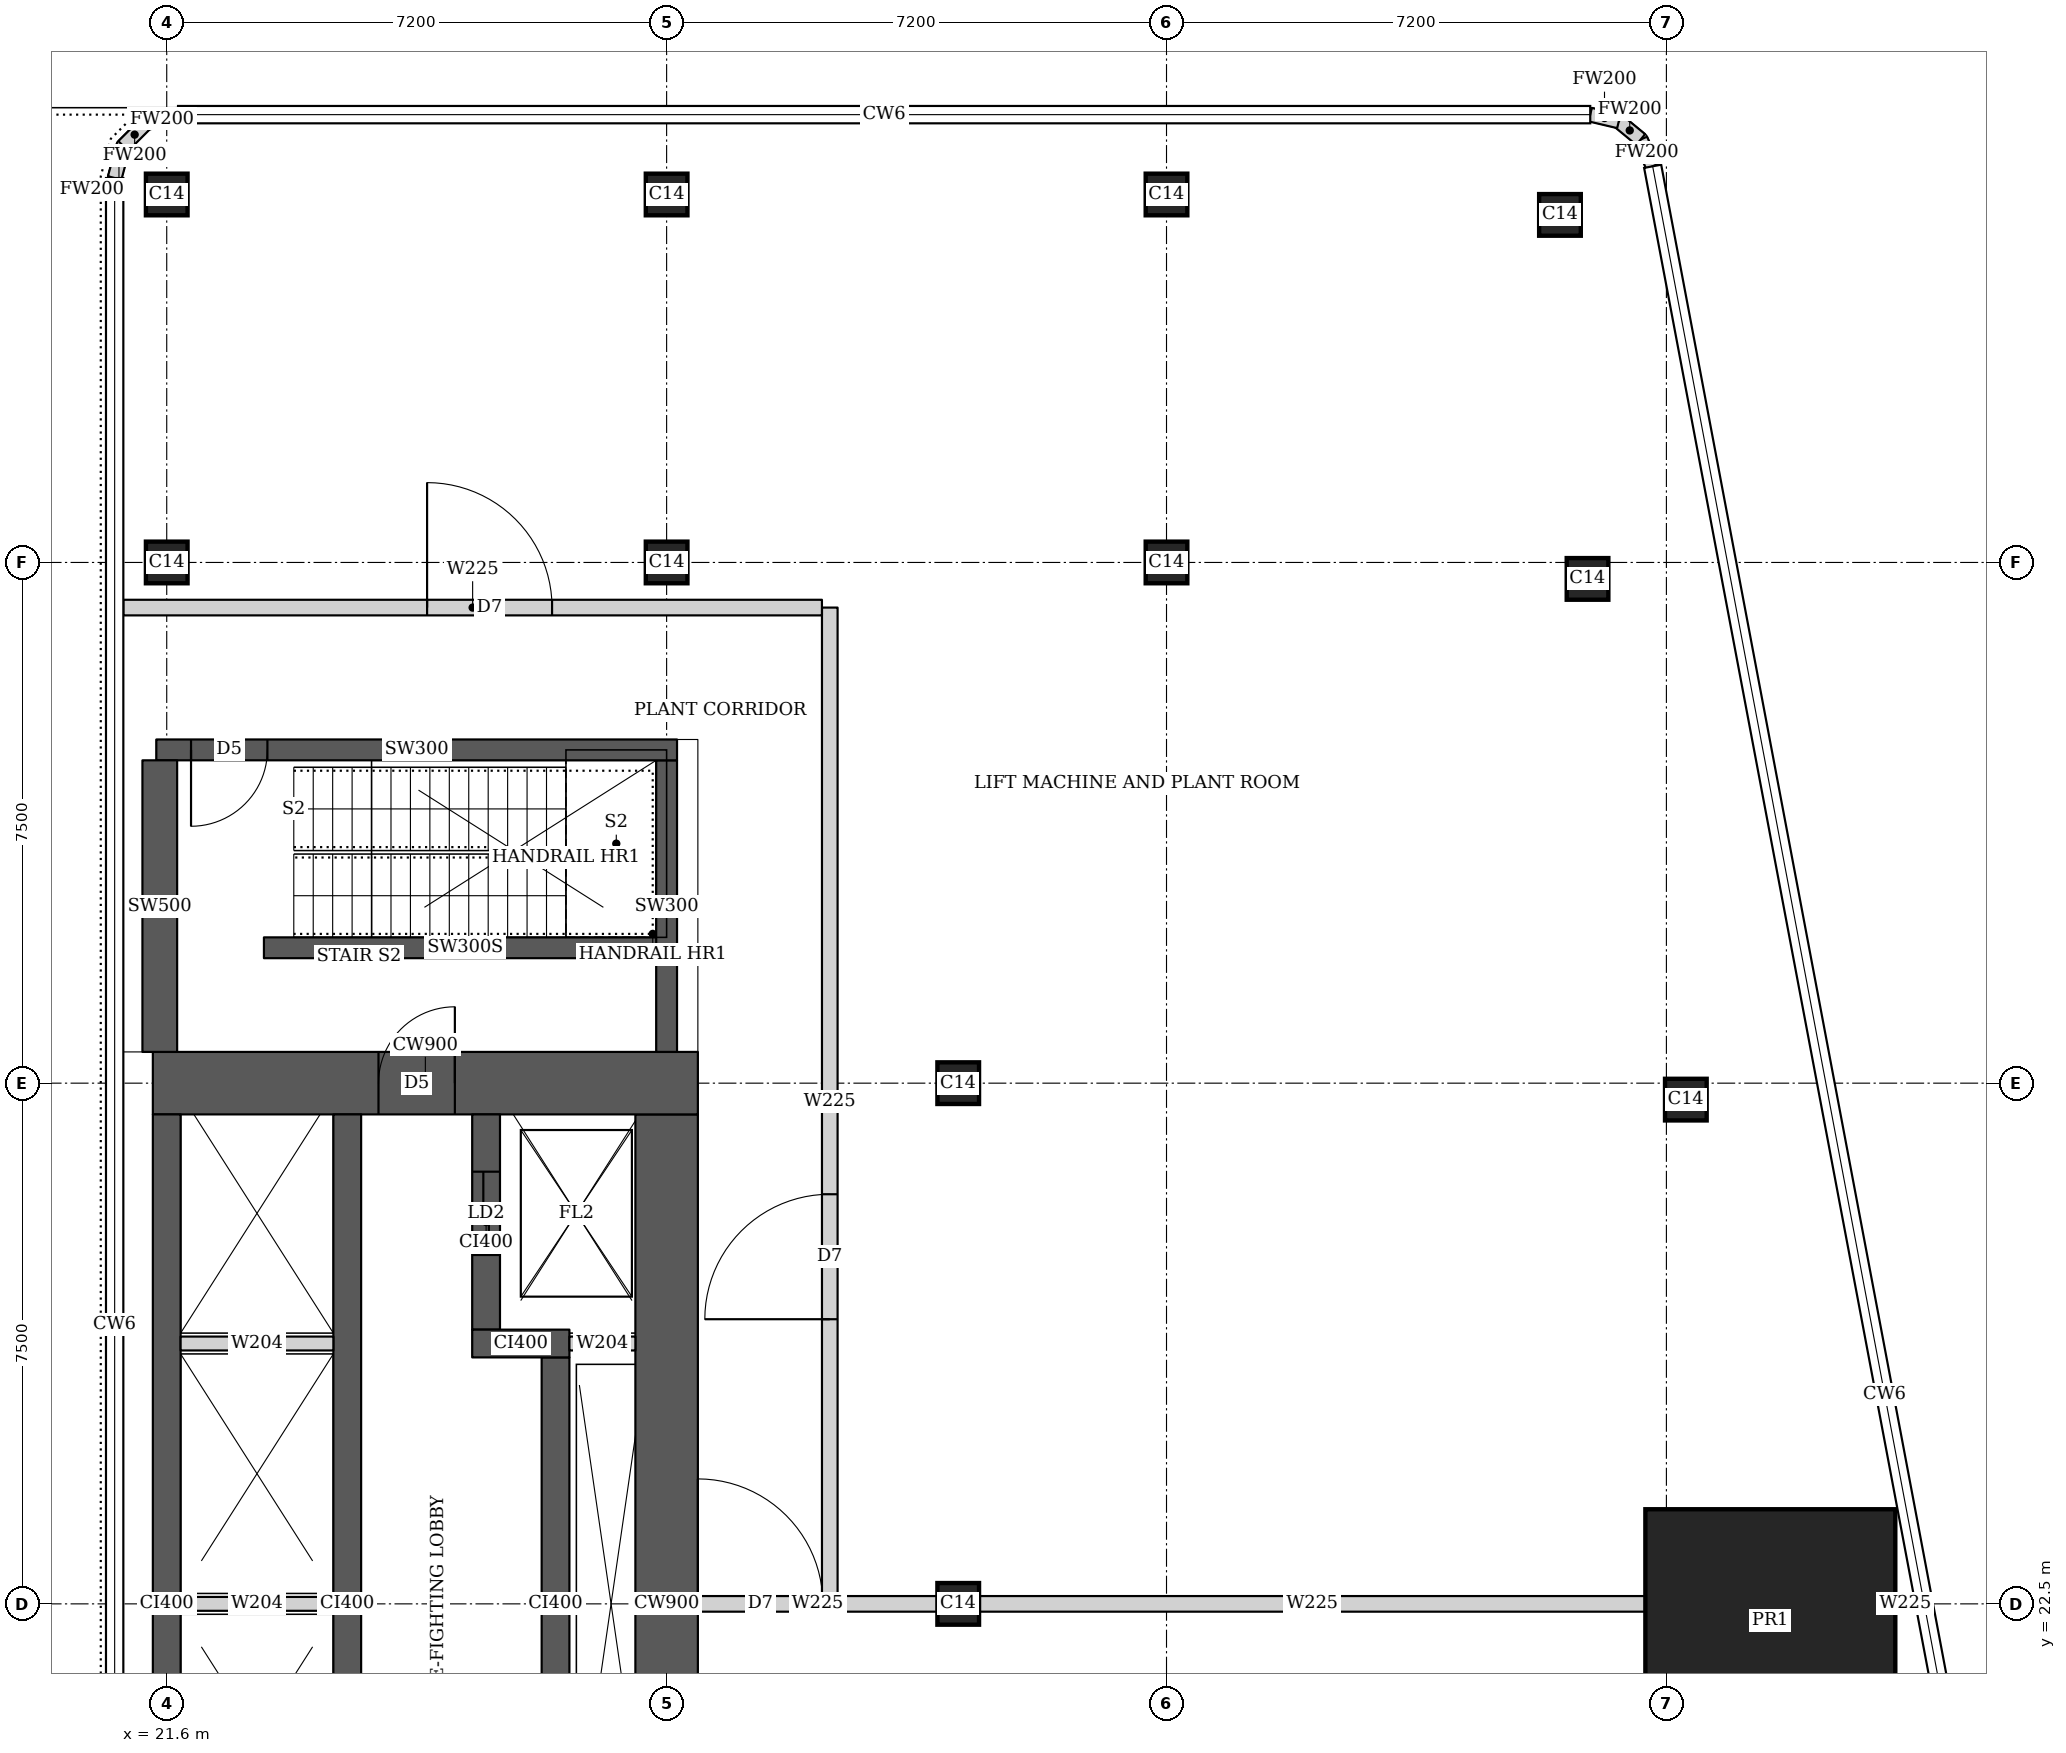
"""IFC4 building model, lengths in metres.
Left out: names, types, materials, properties, quantities, classifications, styles, units other than length and angle.
Written with IfcOpenShell. Run it as: python <this file> out.ifc"""

import sys

from ifc_helpers import new_model, si_unit, direction, frame, frame_2d, origin, origin_2d, place, context, subcontext, project, spatial, rectangle, extrude, element, fill, save


model = new_model("IFC4")
c1 = context("Model", 3, precision=1e-05, world=origin(), true_north=direction((0.0, 1.0)))
c2 = subcontext(c1, "Body", "Model", "MODEL_VIEW")
j1 = project(units=[si_unit("LENGTHUNIT", "METRE"), si_unit("PLANEANGLEUNIT", "RADIAN")], contexts=[c1])
p1 = place(None, origin())
s1 = spatial("IfcSite", under=j1, at=p1, CompositionType="ELEMENT")
p2 = place(p1, origin())
s2 = spatial("IfcBuilding", under=s1, at=p2, CompositionType="ELEMENT")
p3 = place(p2, frame((0.0, 0.0, 296.6)))
s3 = spatial("IfcBuildingStorey", under=s2, at=p3, CompositionType="ELEMENT", Elevation=296.6)
p4 = place(p3, frame((33.0, 22.5, 0.0), z_axis=(0.0, 0.0, 1.0), x_axis=(1.0, 0.0, 0.0)))
e1 = element("IfcColumn", 1, at=p4, inside=s3, PredefinedType="COLUMN", context=c2, shape_type="SweptSolid", body=[
    extrude(rectangle(XDim=0.6, YDim=0.6, at=origin_2d()), origin(), (0.0, 0.0, 1.0), 5.0),
])
p5 = place(p3, frame((44.697, 22.263, 0.0), z_axis=(0.0, 0.0, 1.0), x_axis=(1.0, 0.0, 0.0)))
e2 = element("IfcColumn", 2, at=p5, inside=s3, PredefinedType="COLUMN", context=c2, shape_type="SweptSolid", body=[
    extrude(rectangle(XDim=3.6, YDim=3.2, at=origin_2d()), origin(), (0.0, 0.0, 1.0), 5.0),
])
for number, where, z_axis, x_axis in (
    (3, (33.0, 30.0, 0.0), (0.0, 0.0, 1.0), (1.0, 0.0, 0.0)),
    (4, (43.48, 29.763, 0.0), (0.0, 0.0, 1.0), (1.0, 0.0, 0.0)),
    (5, (21.6, 37.5, 0.0), (0.0, 0.0, 1.0), (1.0, 0.0, 0.0)),
    (6, (28.8, 37.5, 0.0), (0.0, 0.0, 1.0), (1.0, 0.0, 0.0)),
    (7, (36.0, 37.5, 0.0), (0.0, 0.0, 1.0), (1.0, 0.0, 0.0)),
    (8, (42.064, 37.263, 0.0), (0.0, 0.0, 1.0), (1.0, 0.0, 0.0)),
    (9, (21.6, 42.8, 0.0), (0.0, 0.0, 1.0), (1.0, 0.0, 0.0)),
    (10, (28.8, 42.8, 0.0), (0.0, 0.0, 1.0), (1.0, 0.0, 0.0)),
    (11, (36.0, 42.8, 0.0), (0.0, 0.0, 1.0), (1.0, 0.0, 0.0)),
    (12, (41.667, 42.506, 0.0), (0.0, 0.0, 1.0), (1.0, 0.0, 0.0)),
):
    element("IfcColumn", number, at=place(p3, frame(where, z_axis=z_axis, x_axis=x_axis)), inside=s3, PredefinedType="COLUMN", context=c2, shape_type="SweptSolid", body=[
        extrude(rectangle(XDim=0.6, YDim=0.6, at=origin_2d()), origin(), (0.0, 0.0, 1.0), 5.0),
    ])
p6 = place(p3, frame((21.4, 30.0, 0.0), z_axis=(0.0, 0.0, 1.0), x_axis=(1.0, 0.0, 0.0)))
e13 = element("IfcWall", 13, at=p6, inside=s3, PredefinedType="SHEAR", context=c2, shape_type="SweptSolid", body=[
    extrude(rectangle(XDim=7.85, YDim=0.9, at=frame_2d((3.925, 0.0))), origin(), (0.0, 0.0, 1.0), 5.0),
])
p7 = place(p6, frame((3.25, 0.0, 0.0)))
e14 = element("IfcOpeningElement", 14, at=p7, cuts=e13, PredefinedType="OPENING", context=c2, shape_type="SweptSolid", body=[
    extrude(rectangle(XDim=1.1, YDim=2.1, at=frame_2d((0.55, 1.05))), frame((0.0, 0.46, 0.0), z_axis=(0.0, -1.0, 0.0), x_axis=(1.0, 0.0, 0.0)), (0.0, 0.0, 1.0), 0.92),
])
p8 = place(p3, frame((28.8, 15.45, 0.0), z_axis=(0.0, 0.0, 1.0), x_axis=(0.0, 1.0, 0.0)))
e15 = element("IfcWall", 15, at=p8, inside=s3, PredefinedType="SHEAR", context=c2, shape_type="SweptSolid", body=[
    extrude(rectangle(XDim=14.1, YDim=0.9, at=frame_2d((7.05, 0.0))), origin(), (0.0, 0.0, 1.0), 5.0),
])
for number, where, z_axis, x_axis in (
    (16, (21.6, 15.45, 0.0), (0.0, 0.0, 1.0), (0.0, 1.0, 0.0)),
    (17, (24.2, 15.45, 0.0), (0.0, 0.0, 1.0), (0.0, 1.0, 0.0)),
):
    element("IfcWall", number, at=place(p3, frame(where, z_axis=z_axis, x_axis=x_axis)), inside=s3, PredefinedType="SHEAR", context=c2, shape_type="SweptSolid", body=[
        extrude(rectangle(XDim=14.1, YDim=0.4, at=frame_2d((7.05, 0.0))), origin(), (0.0, 0.0, 1.0), 5.0),
    ])
p9 = place(p3, frame((27.2, 18.95, 0.0), z_axis=(0.0, 0.0, 1.0), x_axis=(0.0, 1.0, 0.0)))
e18 = element("IfcWall", 18, at=p9, inside=s3, PredefinedType="SHEAR", context=c2, shape_type="SweptSolid", body=[
    extrude(rectangle(XDim=7.1, YDim=0.4, at=frame_2d((3.55, 0.0))), origin(), (0.0, 0.0, 1.0), 5.0),
])
p10 = place(p3, frame((26.0, 26.25, 0.0), z_axis=(0.0, 0.0, 1.0), x_axis=(1.0, 0.0, 0.0)))
e19 = element("IfcWall", 19, at=p10, inside=s3, PredefinedType="SHEAR", context=c2, shape_type="SweptSolid", body=[
    extrude(rectangle(XDim=1.4, YDim=0.4, at=frame_2d((0.7, 0.0))), origin(), (0.0, 0.0, 1.0), 5.0),
])
p11 = place(p3, frame((26.2, 26.45, 0.0), z_axis=(0.0, 0.0, 1.0), x_axis=(0.0, 1.0, 0.0)))
e20 = element("IfcWall", 20, at=p11, inside=s3, PredefinedType="SHEAR", context=c2, shape_type="SweptSolid", body=[
    extrude(rectangle(XDim=3.1, YDim=0.4, at=frame_2d((1.55, 0.0))), origin(), (0.0, 0.0, 1.0), 5.0),
])
p12 = place(p11, frame((1.075, 0.0, 0.0)))
e21 = element("IfcOpeningElement", 21, at=p12, cuts=e20, PredefinedType="OPENING", context=c2, shape_type="SweptSolid", body=[
    extrude(rectangle(XDim=1.2, YDim=2.1, at=frame_2d((0.6, 1.05))), frame((0.0, 0.21, 0.0), z_axis=(0.0, -1.0, 0.0), x_axis=(1.0, 0.0, 0.0)), (0.0, 0.0, 1.0), 0.42),
])
p13 = place(p3, frame((21.45, 34.8, 0.0), z_axis=(0.0, 0.0, 1.0), x_axis=(1.0, 0.0, 0.0)))
e22 = element("IfcWall", 22, at=p13, inside=s3, PredefinedType="SHEAR", context=c2, shape_type="SweptSolid", body=[
    extrude(rectangle(XDim=7.5, YDim=0.3, at=frame_2d((3.75, 0.0))), origin(), (0.0, 0.0, 1.0), 5.0),
])
p14 = place(p13, frame((0.5, 0.0, 0.0)))
e23 = element("IfcOpeningElement", 23, at=p14, cuts=e22, PredefinedType="OPENING", context=c2, shape_type="SweptSolid", body=[
    extrude(rectangle(XDim=1.1, YDim=2.1, at=frame_2d((0.55, 1.05))), frame((0.0, 0.16, 0.0), z_axis=(0.0, -1.0, 0.0), x_axis=(1.0, 0.0, 0.0)), (0.0, 0.0, 1.0), 0.32),
])
p15 = place(p3, frame((21.5, 30.45, 0.0), z_axis=(0.0, 0.0, 1.0), x_axis=(0.0, 1.0, 0.0)))
e24 = element("IfcWall", 24, at=p15, inside=s3, PredefinedType="SHEAR", context=c2, shape_type="SweptSolid", body=[
    extrude(rectangle(XDim=4.2, YDim=0.5, at=frame_2d((2.1, 0.0))), origin(), (0.0, 0.0, 1.0), 5.0),
])
p16 = place(p3, frame((28.8, 30.45, 0.0), z_axis=(0.0, 0.0, 1.0), x_axis=(0.0, 1.0, 0.0)))
e25 = element("IfcWall", 25, at=p16, inside=s3, PredefinedType="SHEAR", context=c2, shape_type="SweptSolid", body=[
    extrude(rectangle(XDim=4.2, YDim=0.3, at=frame_2d((2.1, 0.0))), origin(), (0.0, 0.0, 1.0), 5.0),
])
p17 = place(p3, frame((43.002, 43.206, 0.0), z_axis=(0.0, 0.0, 1.0), x_axis=(-0.40678170573, 0.913525393124, 0.0)))
e26 = element("IfcWall", 26, at=p17, inside=s3, PredefinedType="SOLIDWALL", context=c2, shape_type="SweptSolid", body=[
    extrude(rectangle(XDim=0.423, YDim=0.2, at=frame_2d((0.211, 0.0))), origin(), (0.0, 0.0, 1.0), 4.65),
])
p18 = place(p3, frame((42.83, 43.592, 0.0), z_axis=(0.0, 0.0, 1.0), x_axis=(-0.771190539797, 0.636604391539, 0.0)))
e27 = element("IfcWall", 27, at=p18, inside=s3, PredefinedType="SOLIDWALL", context=c2, shape_type="SweptSolid", body=[
    extrude(rectangle(XDim=0.41, YDim=0.2, at=frame_2d((0.205, 0.0))), origin(), (0.0, 0.0, 1.0), 4.65),
])
p19 = place(p3, frame((42.514, 43.853, 0.0), z_axis=(0.0, 0.0, 1.0), x_axis=(-0.973288080424, 0.229587265555, 0.0)))
e28 = element("IfcWall", 28, at=p19, inside=s3, PredefinedType="SOLIDWALL", context=c2, shape_type="SweptSolid", body=[
    extrude(rectangle(XDim=0.422, YDim=0.2, at=frame_2d((0.211, 0.0))), origin(), (0.0, 0.0, 1.0), 4.65),
])
p20 = place(p3, frame((21.763, 43.95, 0.0), z_axis=(0.0, 0.0, 1.0), x_axis=(-0.965655254015, -0.259826731483, 0.0)))
e29 = element("IfcWall", 29, at=p20, inside=s3, PredefinedType="SOLIDWALL", context=c2, shape_type="SweptSolid", body=[
    extrude(rectangle(XDim=0.477, YDim=0.2, at=frame_2d((0.239, 0.0))), origin(), (0.0, 0.0, 1.0), 4.65),
])
p21 = place(p3, frame((21.302, 43.826, 0.0), z_axis=(0.0, 0.0, 1.0), x_axis=(-0.707106781187, -0.707106781187, 0.0)))
e30 = element("IfcWall", 30, at=p21, inside=s3, PredefinedType="SOLIDWALL", context=c2, shape_type="SweptSolid", body=[
    extrude(rectangle(XDim=0.464, YDim=0.2, at=frame_2d((0.232, 0.0))), origin(), (0.0, 0.0, 1.0), 4.65),
])
p22 = place(p3, frame((20.974, 43.498, 0.0), z_axis=(0.0, 0.0, 1.0), x_axis=(-0.259826731483, -0.965655254015, 0.0)))
e31 = element("IfcWall", 31, at=p22, inside=s3, PredefinedType="SOLIDWALL", context=c2, shape_type="SweptSolid", body=[
    extrude(rectangle(XDim=0.477, YDim=0.2, at=frame_2d((0.239, 0.0))), origin(), (0.0, 0.0, 1.0), 4.65),
])
p23 = place(p3, frame((29.25, 22.5, 0.0), z_axis=(0.0, 0.0, 1.0), x_axis=(1.0, 0.0, 0.0)))
e32 = element("IfcWall", 32, at=p23, inside=s3, PredefinedType="SOLIDWALL", context=c2, shape_type="SweptSolid", body=[
    extrude(rectangle(XDim=3.449, YDim=0.225, at=frame_2d((1.725, 0.0))), origin(), (0.0, 0.0, 1.0), 4.65),
])
p24 = place(p23, origin())
e33 = element("IfcOpeningElement", 33, at=p24, cuts=e32, PredefinedType="OPENING", context=c2, shape_type="SweptSolid", body=[
    extrude(rectangle(XDim=1.8, YDim=2.4, at=frame_2d((0.9, 1.2))), frame((0.0, 0.123, 0.0), z_axis=(0.0, -1.0, 0.0), x_axis=(1.0, 0.0, 0.0)), (0.0, 0.0, 1.0), 0.245),
])
p25 = place(p3, frame((33.301, 22.5, 0.0), z_axis=(0.0, 0.0, 1.0), x_axis=(1.0, 0.0, 0.0)))
e34 = element("IfcWall", 34, at=p25, inside=s3, PredefinedType="SOLIDWALL", context=c2, shape_type="SweptSolid", body=[
    extrude(rectangle(XDim=9.595, YDim=0.225, at=frame_2d((4.797, 0.0))), origin(), (0.0, 0.0, 1.0), 3.65),
])
p26 = place(p3, frame((46.498, 22.5, 0.0), z_axis=(0.0, 0.0, 1.0), x_axis=(1.0, 0.0, 0.0)))
e35 = element("IfcWall", 35, at=p26, inside=s3, PredefinedType="SOLIDWALL", context=c2, shape_type="SweptSolid", body=[
    extrude(rectangle(XDim=0.288, YDim=0.225, at=frame_2d((0.144, 0.0))), origin(), (0.0, 0.0, 1.0), 4.65),
])
p27 = place(p3, frame((20.975, 36.85, 0.0), z_axis=(0.0, 0.0, 1.0), x_axis=(1.0, 0.0, 0.0)))
e36 = element("IfcWall", 36, at=p27, inside=s3, PredefinedType="SOLIDWALL", context=c2, shape_type="SweptSolid", body=[
    extrude(rectangle(XDim=10.062, YDim=0.225, at=frame_2d((5.031, 0.0))), origin(), (0.0, 0.0, 1.0), 4.65),
])
p28 = place(p27, frame((4.375, 0.0, 0.0)))
e37 = element("IfcOpeningElement", 37, at=p28, cuts=e36, PredefinedType="OPENING", context=c2, shape_type="SweptSolid", body=[
    extrude(rectangle(XDim=1.8, YDim=2.4, at=frame_2d((0.9, 1.2))), frame((0.0, 0.123, 0.0), z_axis=(0.0, -1.0, 0.0), x_axis=(1.0, 0.0, 0.0)), (0.0, 0.0, 1.0), 0.245),
])
p29 = place(p3, frame((31.15, 22.613, 0.0), z_axis=(0.0, 0.0, 1.0), x_axis=(0.0, 1.0, 0.0)))
e38 = element("IfcWall", 38, at=p29, inside=s3, PredefinedType="SOLIDWALL", context=c2, shape_type="SweptSolid", body=[
    extrude(rectangle(XDim=14.237, YDim=0.225, at=frame_2d((7.119, 0.0))), origin(), (0.0, 0.0, 1.0), 4.65),
])
p30 = place(p29, frame((3.987, 0.0, 0.0)))
e39 = element("IfcOpeningElement", 39, at=p30, cuts=e38, PredefinedType="OPENING", context=c2, shape_type="SweptSolid", body=[
    extrude(rectangle(XDim=1.8, YDim=2.4, at=frame_2d((0.9, 1.2))), frame((0.0, 0.123, 0.0), z_axis=(0.0, -1.0, 0.0), x_axis=(1.0, 0.0, 0.0)), (0.0, 0.0, 1.0), 0.245),
])
p31 = place(p3, frame((23.0, 31.95, 0.0), z_axis=(0.0, 0.0, 1.0), x_axis=(1.0, 0.0, 0.0)))
e40 = element("IfcWall", 40, at=p31, inside=s3, PredefinedType="SHEAR", context=c2, shape_type="SweptSolid", body=[
    extrude(rectangle(XDim=5.8, YDim=0.3, at=frame_2d((2.9, 0.0))), origin(), (0.0, 0.0, 1.0), 5.0),
])
for number, where, z_axis, x_axis in (
    (41, (21.8, 22.5, 0.0), (0.0, 0.0, 1.0), (1.0, 0.0, 0.0)),
    (42, (21.8, 26.25, 0.0), (0.0, 0.0, 1.0), (1.0, 0.0, 0.0)),
):
    element("IfcWall", number, at=place(p3, frame(where, z_axis=z_axis, x_axis=x_axis)), inside=s3, PredefinedType="SOLIDWALL", context=c2, shape_type="SweptSolid", body=[
        extrude(rectangle(XDim=2.2, YDim=0.2, at=frame_2d((1.1, 0.0))), origin(), (0.0, 0.0, 1.0), 4.65),
    ])
p32 = place(p3, frame((27.4, 26.25, 0.0), z_axis=(0.0, 0.0, 1.0), x_axis=(1.0, 0.0, 0.0)))
e43 = element("IfcWall", 43, at=p32, inside=s3, PredefinedType="SOLIDWALL", context=c2, shape_type="SweptSolid", body=[
    extrude(rectangle(XDim=0.95, YDim=0.2, at=frame_2d((0.475, 0.0))), origin(), (0.0, 0.0, 1.0), 4.65),
])
p33 = place(p24, origin())
e44 = element("IfcDoor", 44, at=p33, inside=s3, OperationType="DOUBLE_DOOR_SINGLE_SWING", PredefinedType="DOOR", context=c2, shape_type="SweptSolid", body=[
    extrude(rectangle(XDim=1.8, YDim=2.4, at=frame_2d((0.9, 1.2))), frame((0.0, 0.025, 0.0), z_axis=(0.0, -1.0, 0.0), x_axis=(1.0, 0.0, 0.0)), (0.0, 0.0, 1.0), 0.05),
])
fill(e33, e44)
p34 = place(p30, origin())
e45 = element("IfcDoor", 45, at=p34, inside=s3, OperationType="DOUBLE_DOOR_SINGLE_SWING", PredefinedType="DOOR", context=c2, shape_type="SweptSolid", body=[
    extrude(rectangle(XDim=1.8, YDim=2.4, at=frame_2d((0.9, 1.2))), frame((0.0, 0.025, 0.0), z_axis=(0.0, -1.0, 0.0), x_axis=(1.0, 0.0, 0.0)), (0.0, 0.0, 1.0), 0.05),
])
fill(e39, e45)
p35 = place(p28, origin())
e46 = element("IfcDoor", 46, at=p35, inside=s3, OperationType="DOUBLE_DOOR_SINGLE_SWING", PredefinedType="DOOR", context=c2, shape_type="SweptSolid", body=[
    extrude(rectangle(XDim=1.8, YDim=2.4, at=frame_2d((0.9, 1.2))), frame((0.0, 0.025, 0.0), z_axis=(0.0, -1.0, 0.0), x_axis=(1.0, 0.0, 0.0)), (0.0, 0.0, 1.0), 0.05),
])
fill(e37, e46)
p36 = place(p7, origin())
e47 = element("IfcDoor", 47, at=p36, inside=s3, OperationType="SINGLE_SWING_RIGHT", PredefinedType="DOOR", context=c2, shape_type="SweptSolid", body=[
    extrude(rectangle(XDim=1.1, YDim=2.1, at=frame_2d((0.55, 1.05))), frame((0.0, 0.025, 0.0), z_axis=(0.0, -1.0, 0.0), x_axis=(1.0, 0.0, 0.0)), (0.0, 0.0, 1.0), 0.05),
])
fill(e14, e47)
p37 = place(p12, origin())
e48 = element("IfcDoor", 48, at=p37, inside=s3, OperationType="DOUBLE_DOOR_SLIDING", PredefinedType="DOOR", context=c2, shape_type="SweptSolid", body=[
    extrude(rectangle(XDim=1.2, YDim=2.1, at=frame_2d((0.6, 1.05))), frame((0.0, 0.025, 0.0), z_axis=(0.0, -1.0, 0.0), x_axis=(1.0, 0.0, 0.0)), (0.0, 0.0, 1.0), 0.05),
])
fill(e21, e48)
p38 = place(p14, origin())
e49 = element("IfcDoor", 49, at=p38, inside=s3, OperationType="SINGLE_SWING_RIGHT", PredefinedType="DOOR", context=c2, shape_type="SweptSolid", body=[
    extrude(rectangle(XDim=1.1, YDim=2.1, at=frame_2d((0.55, 1.05))), frame((0.0, 0.025, 0.0), z_axis=(0.0, -1.0, 0.0), x_axis=(1.0, 0.0, 0.0)), (0.0, 0.0, 1.0), 0.05),
])
fill(e23, e49)
save(model, sys.argv[1])
